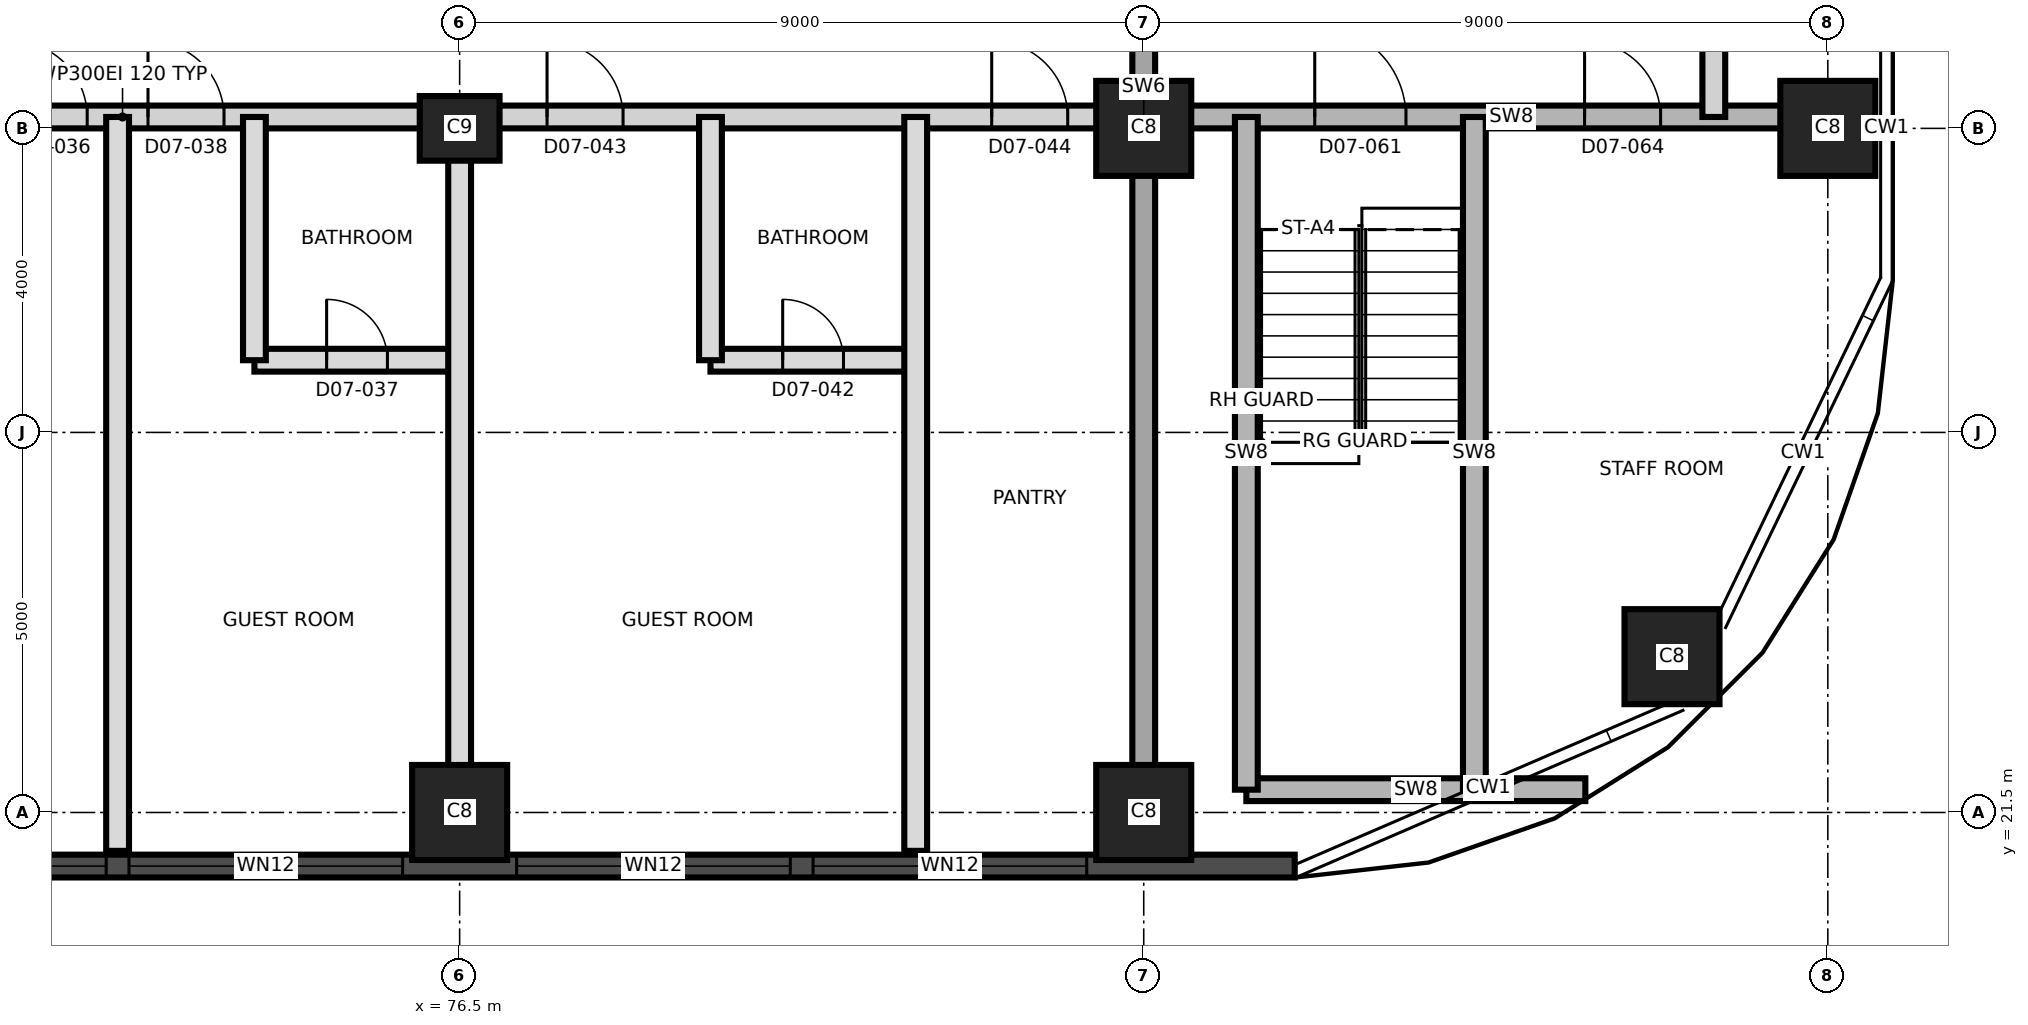
"""IFC4 building model, lengths in metres.
Left out: names, types, materials, properties, quantities, classifications, styles, units other than length and angle.
Written with IfcOpenShell. Run it as: python <this file> out.ifc"""

import sys

from ifc_helpers import new_model, si_unit, direction, frame, frame_2d, origin, origin_2d, place, context, subcontext, project, spatial, rectangle, extrude, element, fill, save


model = new_model("IFC4")
c1 = context("Model", 3, precision=1e-05, world=origin(), true_north=direction((0.0, 1.0)))
c2 = subcontext(c1, "Body", "Model", "MODEL_VIEW")
j1 = project(units=[si_unit("LENGTHUNIT", "METRE"), si_unit("PLANEANGLEUNIT", "RADIAN")], contexts=[c1])
p1 = place(None, origin())
s1 = spatial("IfcSite", under=j1, at=p1, CompositionType="ELEMENT")
p2 = place(p1, origin())
s2 = spatial("IfcBuilding", under=s1, at=p2, CompositionType="ELEMENT")
p3 = place(p2, frame((0.0, 0.0, 94.5)))
s3 = spatial("IfcBuildingStorey", under=s2, at=p3, CompositionType="ELEMENT", Elevation=94.5)
for number, where, z_axis, x_axis in (
    (1, (76.5, 21.5, 0.0), (0.0, 0.0, 1.0), (1.0, 0.0, 0.0)),
    (2, (85.5, 21.5, 0.0), (0.0, 0.0, 1.0), (1.0, 0.0, 0.0)),
    (3, (92.45, 23.55, 0.0), (0.0, 0.0, 1.0), (1.0, 0.0, 0.0)),
):
    element("IfcColumn", number, at=place(p3, frame(where, z_axis=z_axis, x_axis=x_axis)), inside=s3, PredefinedType="COLUMN", context=c2, shape_type="SweptSolid", body=[
        extrude(rectangle(XDim=1.25, YDim=1.25, at=origin_2d()), origin(), (0.0, 0.0, 1.0), 3.7),
    ])
p4 = place(p3, frame((76.5, 30.5, 0.0), z_axis=(0.0, 0.0, 1.0), x_axis=(1.0, 0.0, 0.0)))
e4 = element("IfcColumn", 4, at=p4, inside=s3, PredefinedType="COLUMN", context=c2, shape_type="SweptSolid", body=[
    extrude(rectangle(XDim=1.05, YDim=0.85, at=origin_2d()), origin(), (0.0, 0.0, 1.0), 3.7),
])
for number, where, z_axis, x_axis in (
    (5, (85.5, 30.5, 0.0), (0.0, 0.0, 1.0), (1.0, 0.0, 0.0)),
    (6, (94.5, 30.5, 0.0), (0.0, 0.0, 1.0), (1.0, 0.0, 0.0)),
):
    element("IfcColumn", number, at=place(p3, frame(where, z_axis=z_axis, x_axis=x_axis)), inside=s3, PredefinedType="COLUMN", context=c2, shape_type="SweptSolid", body=[
        extrude(rectangle(XDim=1.25, YDim=1.25, at=origin_2d()), origin(), (0.0, 0.0, 1.0), 3.7),
    ])
p5 = place(p3, frame((85.5, 20.995, 0.0), z_axis=(0.0, 0.0, 1.0), x_axis=(0.0, 1.0, 0.0)))
e7 = element("IfcWall", 7, at=p5, inside=s3, PredefinedType="SHEAR", context=c2, shape_type="SweptSolid", body=[
    extrude(rectangle(XDim=19.01, YDim=0.3, at=frame_2d((9.505, 0.0))), origin(), (0.0, 0.0, 1.0), 3.7),
])
p6 = place(p5, frame((10.705, 0.0, 0.0)))
e8 = element("IfcOpeningElement", 8, at=p6, cuts=e7, PredefinedType="OPENING", context=c2, shape_type="SweptSolid", body=[
    extrude(rectangle(XDim=1.4, YDim=2.1, at=frame_2d((0.7, 1.05))), frame((0.0, 0.16, 0.0), z_axis=(0.0, -1.0, 0.0), x_axis=(1.0, 0.0, 0.0)), (0.0, 0.0, 1.0), 0.32),
])
p7 = place(p3, frame((44.011, 20.795, 0.0), z_axis=(0.0, 0.0, 1.0), x_axis=(1.0, 0.0, 0.0)))
e9 = element("IfcWall", 9, at=p7, inside=s3, PredefinedType="SOLIDWALL", context=c2, shape_type="SweptSolid", body=[
    extrude(rectangle(XDim=43.476, YDim=0.3, at=frame_2d((21.738, 0.0))), origin(), (0.0, 0.0, 1.0), 3.4),
])
p8 = place(p7, frame((1.845, 0.0, 0.3)))
e10 = element("IfcOpeningElement", 10, at=p8, cuts=e9, PredefinedType="OPENING", context=c2, shape_type="SweptSolid", body=[
    extrude(rectangle(XDim=1.8, YDim=2.4, at=frame_2d((0.9, 1.2))), frame((0.0, 0.16, 0.0), z_axis=(0.0, -1.0, 0.0), x_axis=(1.0, 0.0, 0.0)), (0.0, 0.0, 1.0), 0.32),
])
p9 = place(p7, frame((5.639, 0.0, 0.9)))
e11 = element("IfcOpeningElement", 11, at=p9, cuts=e9, PredefinedType="OPENING", context=c2, shape_type="SweptSolid", body=[
    extrude(rectangle(XDim=4.2, YDim=1.5, at=frame_2d((2.1, 0.75))), frame((0.0, 0.16, 0.0), z_axis=(0.0, -1.0, 0.0), x_axis=(1.0, 0.0, 0.0)), (0.0, 0.0, 1.0), 0.32),
])
p10 = place(p7, frame((10.139, 0.0, 0.9)))
e12 = element("IfcOpeningElement", 12, at=p10, cuts=e9, PredefinedType="OPENING", context=c2, shape_type="SweptSolid", body=[
    extrude(rectangle(XDim=4.2, YDim=1.5, at=frame_2d((2.1, 0.75))), frame((0.0, 0.16, 0.0), z_axis=(0.0, -1.0, 0.0), x_axis=(1.0, 0.0, 0.0)), (0.0, 0.0, 1.0), 0.32),
])
p11 = place(p7, frame((14.639, 0.0, 0.9)))
e13 = element("IfcOpeningElement", 13, at=p11, cuts=e9, PredefinedType="OPENING", context=c2, shape_type="SweptSolid", body=[
    extrude(rectangle(XDim=4.2, YDim=1.5, at=frame_2d((2.1, 0.75))), frame((0.0, 0.16, 0.0), z_axis=(0.0, -1.0, 0.0), x_axis=(1.0, 0.0, 0.0)), (0.0, 0.0, 1.0), 0.32),
])
p12 = place(p7, frame((19.139, 0.0, 0.9)))
e14 = element("IfcOpeningElement", 14, at=p12, cuts=e9, PredefinedType="OPENING", context=c2, shape_type="SweptSolid", body=[
    extrude(rectangle(XDim=3.6, YDim=1.5, at=frame_2d((1.8, 0.75))), frame((0.0, 0.16, 0.0), z_axis=(0.0, -1.0, 0.0), x_axis=(1.0, 0.0, 0.0)), (0.0, 0.0, 1.0), 0.32),
])
p13 = place(p7, frame((24.239, 0.0, 0.9)))
e15 = element("IfcOpeningElement", 15, at=p13, cuts=e9, PredefinedType="OPENING", context=c2, shape_type="SweptSolid", body=[
    extrude(rectangle(XDim=3.6, YDim=1.5, at=frame_2d((1.8, 0.75))), frame((0.0, 0.16, 0.0), z_axis=(0.0, -1.0, 0.0), x_axis=(1.0, 0.0, 0.0)), (0.0, 0.0, 1.0), 0.32),
])
p14 = place(p7, frame((28.139, 0.0, 0.9)))
e16 = element("IfcOpeningElement", 16, at=p14, cuts=e9, PredefinedType="OPENING", context=c2, shape_type="SweptSolid", body=[
    extrude(rectangle(XDim=3.6, YDim=1.5, at=frame_2d((1.8, 0.75))), frame((0.0, 0.16, 0.0), z_axis=(0.0, -1.0, 0.0), x_axis=(1.0, 0.0, 0.0)), (0.0, 0.0, 1.0), 0.32),
])
p15 = place(p7, frame((33.239, 0.0, 0.9)))
e17 = element("IfcOpeningElement", 17, at=p15, cuts=e9, PredefinedType="OPENING", context=c2, shape_type="SweptSolid", body=[
    extrude(rectangle(XDim=3.6, YDim=1.5, at=frame_2d((1.8, 0.75))), frame((0.0, 0.16, 0.0), z_axis=(0.0, -1.0, 0.0), x_axis=(1.0, 0.0, 0.0)), (0.0, 0.0, 1.0), 0.32),
])
p16 = place(p7, frame((37.139, 0.0, 0.9)))
e18 = element("IfcOpeningElement", 18, at=p16, cuts=e9, PredefinedType="OPENING", context=c2, shape_type="SweptSolid", body=[
    extrude(rectangle(XDim=3.6, YDim=1.5, at=frame_2d((1.8, 0.75))), frame((0.0, 0.16, 0.0), z_axis=(0.0, -1.0, 0.0), x_axis=(1.0, 0.0, 0.0)), (0.0, 0.0, 1.0), 0.32),
])
p17 = place(p3, frame((86.85, 21.8, 0.0), z_axis=(0.0, 0.0, 1.0), x_axis=(1.0, 0.0, 0.0)))
e19 = element("IfcWall", 19, at=p17, inside=s3, PredefinedType="SHEAR", context=c2, shape_type="SweptSolid", body=[
    extrude(rectangle(XDim=4.46, YDim=0.3, at=frame_2d((2.23, 0.0))), origin(), (0.0, 0.0, 1.0), 3.4),
])
p18 = place(p3, frame((73.8, 27.45, 0.0), z_axis=(0.0, 0.0, 1.0), x_axis=(1.0, 0.0, 0.0)))
e20 = element("IfcWall", 20, at=p18, inside=s3, PredefinedType="PARTITIONING", context=c2, shape_type="SweptSolid", body=[
    extrude(rectangle(XDim=2.7, YDim=0.3, at=frame_2d((1.35, 0.0))), origin(), (0.0, 0.0, 1.0), 3.4),
])
p19 = place(p18, frame((0.95, 0.0, 0.0)))
e21 = element("IfcOpeningElement", 21, at=p19, cuts=e20, PredefinedType="OPENING", context=c2, shape_type="SweptSolid", body=[
    extrude(rectangle(XDim=0.8, YDim=2.1, at=frame_2d((0.4, 1.05))), frame((0.0, 0.16, 0.0), z_axis=(0.0, -1.0, 0.0), x_axis=(1.0, 0.0, 0.0)), (0.0, 0.0, 1.0), 0.32),
])
p20 = place(p3, frame((79.8, 27.45, 0.0), z_axis=(0.0, 0.0, 1.0), x_axis=(1.0, 0.0, 0.0)))
e22 = element("IfcWall", 22, at=p20, inside=s3, PredefinedType="PARTITIONING", context=c2, shape_type="SweptSolid", body=[
    extrude(rectangle(XDim=2.7, YDim=0.3, at=frame_2d((1.35, 0.0))), origin(), (0.0, 0.0, 1.0), 3.4),
])
p21 = place(p20, frame((0.95, 0.0, 0.0)))
e23 = element("IfcOpeningElement", 23, at=p21, cuts=e22, PredefinedType="OPENING", context=c2, shape_type="SweptSolid", body=[
    extrude(rectangle(XDim=0.8, YDim=2.1, at=frame_2d((0.4, 1.05))), frame((0.0, 0.16, 0.0), z_axis=(0.0, -1.0, 0.0), x_axis=(1.0, 0.0, 0.0)), (0.0, 0.0, 1.0), 0.32),
])
p22 = place(p3, frame((58.8, 30.65, 0.0), z_axis=(0.0, 0.0, 1.0), x_axis=(1.0, 0.0, 0.0)))
e24 = element("IfcWall", 24, at=p22, inside=s3, PredefinedType="PARTITIONING", context=c2, shape_type="SweptSolid", body=[
    extrude(rectangle(XDim=26.53, YDim=0.3, at=frame_2d((13.265, 0.0))), origin(), (0.0, 0.0, 1.0), 3.4),
])
p23 = place(p22, frame((3.7, 0.0, 0.0)))
e25 = element("IfcOpeningElement", 25, at=p23, cuts=e24, PredefinedType="OPENING", context=c2, shape_type="SweptSolid", body=[
    extrude(rectangle(XDim=1.0, YDim=2.4, at=frame_2d((0.5, 1.2))), frame((0.0, 0.16, 0.0), z_axis=(0.0, -1.0, 0.0), x_axis=(1.0, 0.0, 0.0)), (0.0, 0.0, 1.0), 0.32),
])
p24 = place(p22, frame((11.8, 0.0, 0.0)))
e26 = element("IfcOpeningElement", 26, at=p24, cuts=e24, PredefinedType="OPENING", context=c2, shape_type="SweptSolid", body=[
    extrude(rectangle(XDim=1.0, YDim=2.1, at=frame_2d((0.5, 1.05))), frame((0.0, 0.16, 0.0), z_axis=(0.0, -1.0, 0.0), x_axis=(1.0, 0.0, 0.0)), (0.0, 0.0, 1.0), 0.32),
])
p25 = place(p22, frame((13.6, 0.0, 0.0)))
e27 = element("IfcOpeningElement", 27, at=p25, cuts=e24, PredefinedType="OPENING", context=c2, shape_type="SweptSolid", body=[
    extrude(rectangle(XDim=1.0, YDim=2.1, at=frame_2d((0.5, 1.05))), frame((0.0, 0.16, 0.0), z_axis=(0.0, -1.0, 0.0), x_axis=(1.0, 0.0, 0.0)), (0.0, 0.0, 1.0), 0.32),
])
p26 = place(p22, frame((18.85, 0.0, 0.0)))
e28 = element("IfcOpeningElement", 28, at=p26, cuts=e24, PredefinedType="OPENING", context=c2, shape_type="SweptSolid", body=[
    extrude(rectangle(XDim=1.0, YDim=2.1, at=frame_2d((0.5, 1.05))), frame((0.0, 0.16, 0.0), z_axis=(0.0, -1.0, 0.0), x_axis=(1.0, 0.0, 0.0)), (0.0, 0.0, 1.0), 0.32),
])
p27 = place(p22, frame((24.7, 0.0, 0.0)))
e29 = element("IfcOpeningElement", 29, at=p27, cuts=e24, PredefinedType="OPENING", context=c2, shape_type="SweptSolid", body=[
    extrude(rectangle(XDim=1.0, YDim=2.1, at=frame_2d((0.5, 1.05))), frame((0.0, 0.16, 0.0), z_axis=(0.0, -1.0, 0.0), x_axis=(1.0, 0.0, 0.0)), (0.0, 0.0, 1.0), 0.32),
])
p28 = place(p3, frame((85.67, 30.65, 0.0), z_axis=(0.0, 0.0, 1.0), x_axis=(1.0, 0.0, 0.0)))
e30 = element("IfcWall", 30, at=p28, inside=s3, PredefinedType="SHEAR", context=c2, shape_type="SweptSolid", body=[
    extrude(rectangle(XDim=9.335, YDim=0.3, at=frame_2d((4.667, 0.0))), origin(), (0.0, 0.0, 1.0), 3.4),
])
p29 = place(p28, frame((2.08, 0.0, 0.0)))
e31 = element("IfcOpeningElement", 31, at=p29, cuts=e30, PredefinedType="OPENING", context=c2, shape_type="SweptSolid", body=[
    extrude(rectangle(XDim=1.2, YDim=2.1, at=frame_2d((0.6, 1.05))), frame((0.0, 0.16, 0.0), z_axis=(0.0, -1.0, 0.0), x_axis=(1.0, 0.0, 0.0)), (0.0, 0.0, 1.0), 0.32),
])
p30 = place(p28, frame((5.63, 0.0, 0.0)))
e32 = element("IfcOpeningElement", 32, at=p30, cuts=e30, PredefinedType="OPENING", context=c2, shape_type="SweptSolid", body=[
    extrude(rectangle(XDim=1.0, YDim=2.1, at=frame_2d((0.5, 1.05))), frame((0.0, 0.16, 0.0), z_axis=(0.0, -1.0, 0.0), x_axis=(1.0, 0.0, 0.0)), (0.0, 0.0, 1.0), 0.32),
])
p31 = place(p3, frame((72.0, 20.995, 0.0), z_axis=(0.0, 0.0, 1.0), x_axis=(0.0, 1.0, 0.0)))
e33 = element("IfcWall", 33, at=p31, inside=s3, PredefinedType="PARTITIONING", context=c2, shape_type="SweptSolid", body=[
    extrude(rectangle(XDim=9.655, YDim=0.3, at=frame_2d((4.827, 0.0))), origin(), (0.0, 0.0, 1.0), 3.35),
])
p32 = place(p3, frame((73.8, 27.45, 0.0), z_axis=(0.0, 0.0, 1.0), x_axis=(0.0, 1.0, 0.0)))
e34 = element("IfcWall", 34, at=p32, inside=s3, PredefinedType="PARTITIONING", context=c2, shape_type="SweptSolid", body=[
    extrude(rectangle(XDim=3.2, YDim=0.3, at=frame_2d((1.6, 0.0))), origin(), (0.0, 0.0, 1.0), 3.4),
])
p33 = place(p3, frame((76.5, 20.995, 0.0), z_axis=(0.0, 0.0, 1.0), x_axis=(0.0, 1.0, 0.0)))
e35 = element("IfcWall", 35, at=p33, inside=s3, PredefinedType="PARTITIONING", context=c2, shape_type="SweptSolid", body=[
    extrude(rectangle(XDim=9.655, YDim=0.3, at=frame_2d((4.827, 0.0))), origin(), (0.0, 0.0, 1.0), 3.35),
])
p34 = place(p3, frame((79.8, 27.45, 0.0), z_axis=(0.0, 0.0, 1.0), x_axis=(0.0, 1.0, 0.0)))
e36 = element("IfcWall", 36, at=p34, inside=s3, PredefinedType="PARTITIONING", context=c2, shape_type="SweptSolid", body=[
    extrude(rectangle(XDim=3.2, YDim=0.3, at=frame_2d((1.6, 0.0))), origin(), (0.0, 0.0, 1.0), 3.4),
])
p35 = place(p3, frame((82.5, 20.995, 0.0), z_axis=(0.0, 0.0, 1.0), x_axis=(0.0, 1.0, 0.0)))
e37 = element("IfcWall", 37, at=p35, inside=s3, PredefinedType="PARTITIONING", context=c2, shape_type="SweptSolid", body=[
    extrude(rectangle(XDim=9.655, YDim=0.3, at=frame_2d((4.827, 0.0))), origin(), (0.0, 0.0, 1.0), 3.35),
])
for number, where, z_axis, x_axis in (
    (38, (86.85, 21.8, 0.0), (0.0, 0.0, 1.0), (0.0, 1.0, 0.0)),
    (39, (89.85, 21.8, 0.0), (0.0, 0.0, 1.0), (0.0, 1.0, 0.0)),
):
    element("IfcWall", number, at=place(p3, frame(where, z_axis=z_axis, x_axis=x_axis)), inside=s3, PredefinedType="SHEAR", context=c2, shape_type="SweptSolid", body=[
        extrude(rectangle(XDim=8.85, YDim=0.3, at=frame_2d((4.425, 0.0))), origin(), (0.0, 0.0, 1.0), 3.4),
    ])
p36 = place(p3, frame((93.0, 30.65, 0.0), z_axis=(0.0, 0.0, 1.0), x_axis=(0.0, 1.0, 0.0)))
e40 = element("IfcWall", 40, at=p36, inside=s3, PredefinedType="PARTITIONING", context=c2, shape_type="SweptSolid", body=[
    extrude(rectangle(XDim=2.7, YDim=0.3, at=frame_2d((1.35, 0.0))), origin(), (0.0, 0.0, 1.0), 3.4),
])
p37 = place(p13, origin())
e41 = element("IfcWindow", 41, at=p37, inside=s3, PartitioningType="SINGLE_PANEL", PredefinedType="WINDOW", context=c2, shape_type="SweptSolid", body=[
    extrude(rectangle(XDim=3.6, YDim=1.5, at=frame_2d((1.8, 0.75))), frame((0.0, 0.03, 0.0), z_axis=(0.0, -1.0, 0.0), x_axis=(1.0, 0.0, 0.0)), (0.0, 0.0, 1.0), 0.06),
])
fill(e15, e41)
p38 = place(p14, origin())
e42 = element("IfcWindow", 42, at=p38, inside=s3, PartitioningType="SINGLE_PANEL", PredefinedType="WINDOW", context=c2, shape_type="SweptSolid", body=[
    extrude(rectangle(XDim=3.6, YDim=1.5, at=frame_2d((1.8, 0.75))), frame((0.0, 0.03, 0.0), z_axis=(0.0, -1.0, 0.0), x_axis=(1.0, 0.0, 0.0)), (0.0, 0.0, 1.0), 0.06),
])
fill(e16, e42)
p39 = place(p15, origin())
e43 = element("IfcWindow", 43, at=p39, inside=s3, PartitioningType="SINGLE_PANEL", PredefinedType="WINDOW", context=c2, shape_type="SweptSolid", body=[
    extrude(rectangle(XDim=3.6, YDim=1.5, at=frame_2d((1.8, 0.75))), frame((0.0, 0.03, 0.0), z_axis=(0.0, -1.0, 0.0), x_axis=(1.0, 0.0, 0.0)), (0.0, 0.0, 1.0), 0.06),
])
fill(e17, e43)
p40 = place(p16, origin())
e44 = element("IfcWindow", 44, at=p40, inside=s3, PartitioningType="SINGLE_PANEL", PredefinedType="WINDOW", context=c2, shape_type="SweptSolid", body=[
    extrude(rectangle(XDim=3.6, YDim=1.5, at=frame_2d((1.8, 0.75))), frame((0.0, 0.03, 0.0), z_axis=(0.0, -1.0, 0.0), x_axis=(1.0, 0.0, 0.0)), (0.0, 0.0, 1.0), 0.06),
])
fill(e18, e44)
p41 = place(p24, origin())
e45 = element("IfcDoor", 45, at=p41, inside=s3, OperationType="SINGLE_SWING_LEFT", PredefinedType="DOOR", context=c2, shape_type="SweptSolid", body=[
    extrude(rectangle(XDim=1.0, YDim=2.1, at=frame_2d((0.5, 1.05))), frame((0.0, 0.025, 0.0), z_axis=(0.0, -1.0, 0.0), x_axis=(1.0, 0.0, 0.0)), (0.0, 0.0, 1.0), 0.05),
])
fill(e26, e45)
p42 = place(p19, origin())
e46 = element("IfcDoor", 46, at=p42, inside=s3, OperationType="SINGLE_SWING_LEFT", PredefinedType="DOOR", context=c2, shape_type="SweptSolid", body=[
    extrude(rectangle(XDim=0.8, YDim=2.1, at=frame_2d((0.4, 1.05))), frame((0.0, 0.025, 0.0), z_axis=(0.0, -1.0, 0.0), x_axis=(1.0, 0.0, 0.0)), (0.0, 0.0, 1.0), 0.05),
])
fill(e21, e46)
p43 = place(p25, origin())
e47 = element("IfcDoor", 47, at=p43, inside=s3, OperationType="SINGLE_SWING_RIGHT", PredefinedType="DOOR", context=c2, shape_type="SweptSolid", body=[
    extrude(rectangle(XDim=1.0, YDim=2.1, at=frame_2d((0.5, 1.05))), frame((0.0, 0.025, 0.0), z_axis=(0.0, -1.0, 0.0), x_axis=(1.0, 0.0, 0.0)), (0.0, 0.0, 1.0), 0.05),
])
fill(e27, e47)
p44 = place(p21, origin())
e48 = element("IfcDoor", 48, at=p44, inside=s3, OperationType="SINGLE_SWING_RIGHT", PredefinedType="DOOR", context=c2, shape_type="SweptSolid", body=[
    extrude(rectangle(XDim=0.8, YDim=2.1, at=frame_2d((0.4, 1.05))), frame((0.0, 0.025, 0.0), z_axis=(0.0, -1.0, 0.0), x_axis=(1.0, 0.0, 0.0)), (0.0, 0.0, 1.0), 0.05),
])
fill(e23, e48)
p45 = place(p26, origin())
e49 = element("IfcDoor", 49, at=p45, inside=s3, OperationType="SINGLE_SWING_LEFT", PredefinedType="DOOR", context=c2, shape_type="SweptSolid", body=[
    extrude(rectangle(XDim=1.0, YDim=2.1, at=frame_2d((0.5, 1.05))), frame((0.0, 0.025, 0.0), z_axis=(0.0, -1.0, 0.0), x_axis=(1.0, 0.0, 0.0)), (0.0, 0.0, 1.0), 0.05),
])
fill(e28, e49)
p46 = place(p27, origin())
e50 = element("IfcDoor", 50, at=p46, inside=s3, OperationType="SINGLE_SWING_LEFT", PredefinedType="DOOR", context=c2, shape_type="SweptSolid", body=[
    extrude(rectangle(XDim=1.0, YDim=2.1, at=frame_2d((0.5, 1.05))), frame((0.0, 0.025, 0.0), z_axis=(0.0, -1.0, 0.0), x_axis=(1.0, 0.0, 0.0)), (0.0, 0.0, 1.0), 0.05),
])
fill(e29, e50)
p47 = place(p29, origin())
e51 = element("IfcDoor", 51, at=p47, inside=s3, OperationType="SINGLE_SWING_LEFT", PredefinedType="DOOR", context=c2, shape_type="SweptSolid", body=[
    extrude(rectangle(XDim=1.2, YDim=2.1, at=frame_2d((0.6, 1.05))), frame((0.0, 0.025, 0.0), z_axis=(0.0, -1.0, 0.0), x_axis=(1.0, 0.0, 0.0)), (0.0, 0.0, 1.0), 0.05),
])
fill(e31, e51)
p48 = place(p30, origin())
e52 = element("IfcDoor", 52, at=p48, inside=s3, OperationType="SINGLE_SWING_LEFT", PredefinedType="DOOR", context=c2, shape_type="SweptSolid", body=[
    extrude(rectangle(XDim=1.0, YDim=2.1, at=frame_2d((0.5, 1.05))), frame((0.0, 0.025, 0.0), z_axis=(0.0, -1.0, 0.0), x_axis=(1.0, 0.0, 0.0)), (0.0, 0.0, 1.0), 0.05),
])
fill(e32, e52)
save(model, sys.argv[1])
